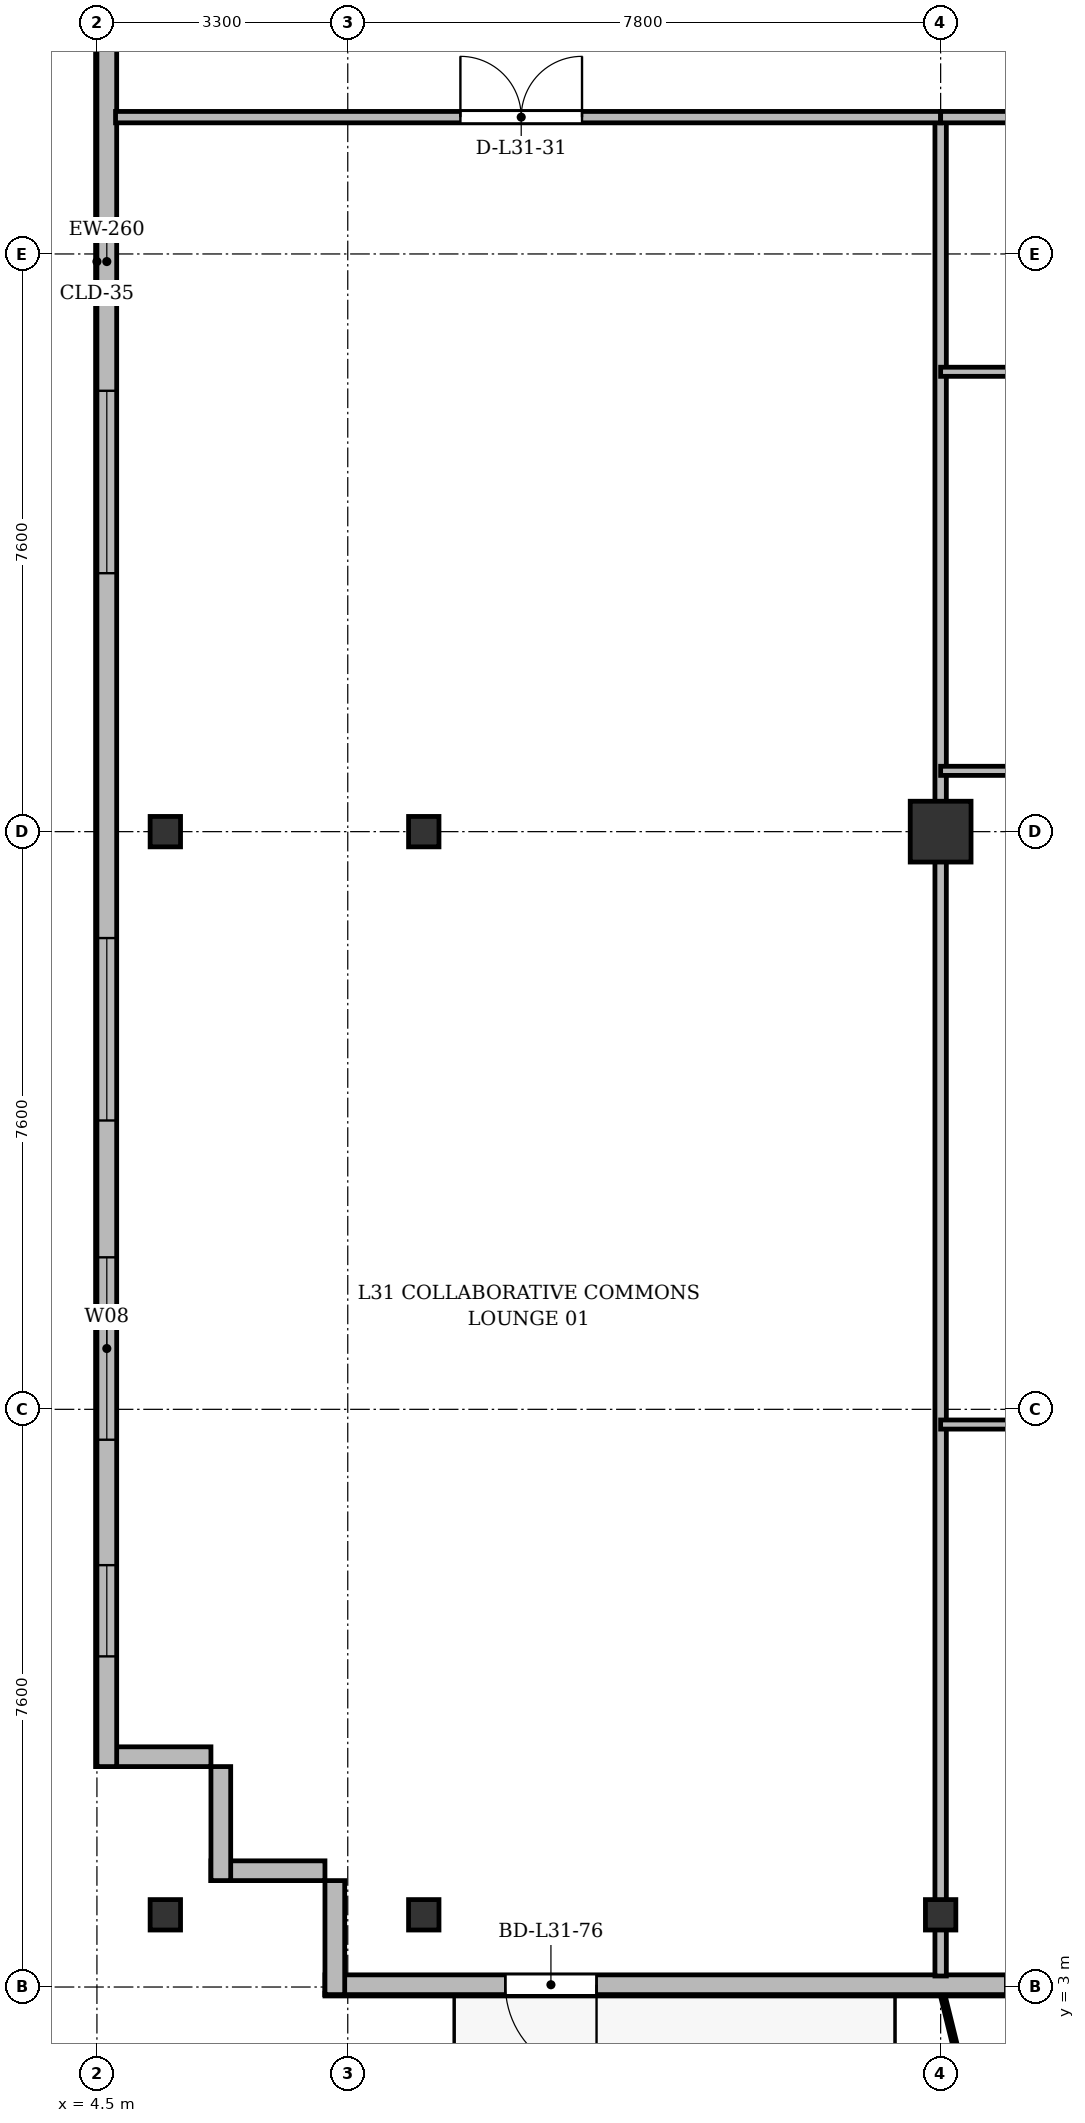
"""IFC4 building model, lengths in metres.
Left out: names, types, materials, properties, quantities, classifications, styles, units other than length and angle.
Written with IfcOpenShell. Run it as: python <this file> out.ifc"""

import sys

from ifc_helpers import new_model, si_unit, direction, frame, frame_2d, origin, origin_2d, place, context, subcontext, project, spatial, rectangle, i_section, extrude, source, transform, mapped, element, fill, save


model = new_model("IFC4")
c1 = context("Model", 3, precision=1e-05, world=origin(), true_north=direction((0.0, 1.0)))
c2 = subcontext(c1, "Body", "Model", "MODEL_VIEW")
j1 = project(units=[si_unit("LENGTHUNIT", "METRE"), si_unit("PLANEANGLEUNIT", "RADIAN")], contexts=[c1])
p1 = place(None, origin())
s1 = spatial("IfcSite", under=j1, at=p1, CompositionType="ELEMENT")
p2 = place(p1, origin())
s2 = spatial("IfcBuilding", under=s1, at=p2, CompositionType="ELEMENT")
p3 = place(p2, frame((0.0, 0.0, 121.3)))
s3 = spatial("IfcBuildingStorey", under=s2, at=p3, CompositionType="ELEMENT", Elevation=121.3)
m1 = source(origin(), c2, "Body", "SweptSolid", [
    extrude(i_section(OverallWidth=0.4, OverallDepth=0.4, WebThickness=0.022, FlangeThickness=0.035, at=origin_2d()), origin(), (0.0, 0.0, 1.0), 3.6),
])
for number, where, z_axis, x_axis in (
    (1, (5.4, 3.95, 0.0), (0.0, 0.0, 1.0), (1.0, 0.0, 0.0)),
    (2, (5.4, 18.2, 0.0), (0.0, 0.0, 1.0), (1.0, 0.0, 0.0)),
    (3, (8.8, 3.95, 0.0), (0.0, 0.0, 1.0), (1.0, 0.0, 0.0)),
    (4, (8.8, 18.2, 0.0), (0.0, 0.0, 1.0), (1.0, 0.0, 0.0)),
    (5, (15.6, 3.95, 0.0), (0.0, 0.0, 1.0), (1.0, 0.0, 0.0)),
):
    element("IfcColumn", number, at=place(p3, frame(where, z_axis=z_axis, x_axis=x_axis)), inside=s3, PredefinedType="COLUMN", context=c2, shape_type="MappedRepresentation", body=[
        mapped(m1, transform((0.0, 0.0, 0.0), x_axis=(1.0, 0.0, 0.0), y_axis=(0.0, 1.0, 0.0), z_axis=(0.0, 0.0, 1.0), scale=1.0)),
    ])
m2 = source(origin(), c2, "Body", "SweptSolid", [
    extrude(rectangle(XDim=0.8, YDim=0.8, at=origin_2d()), origin(), (0.0, 0.0, 1.0), 3.6),
])
p4 = place(p3, frame((15.6, 18.2, 0.0), z_axis=(0.0, 0.0, 1.0), x_axis=(1.0, 0.0, 0.0)))
e6 = element("IfcColumn", 6, at=p4, inside=s3, PredefinedType="COLUMN", context=c2, shape_type="MappedRepresentation", body=[
    mapped(m2, transform((0.0, 0.0, 0.0), x_axis=(1.0, 0.0, 0.0), y_axis=(0.0, 1.0, 0.0), z_axis=(0.0, 0.0, 1.0), scale=1.0)),
])
for number, where, z_axis, x_axis in (
    (7, (7.5, 4.53, 0.0), (0.0, 0.0, 1.0), (-1.0, 0.0, 0.0)),
    (8, (6.13, 4.4, 0.0), (0.0, 0.0, 1.0), (0.0, 1.0, 0.0)),
):
    element("IfcWall", number, at=place(p3, frame(where, z_axis=z_axis, x_axis=x_axis)), inside=s3, PredefinedType="SOLIDWALL", context=c2, shape_type="SweptSolid", body=[
        extrude(rectangle(XDim=1.5, YDim=0.26, at=frame_2d((0.75, 0.0))), origin(), (0.0, 0.0, 1.0), 3.34),
    ])
p5 = place(p3, frame((6.0, 6.03, 0.0), z_axis=(0.0, 0.0, 1.0), x_axis=(-1.0, 0.0, 0.0)))
e9 = element("IfcWall", 9, at=p5, inside=s3, PredefinedType="SOLIDWALL", context=c2, shape_type="SweptSolid", body=[
    extrude(rectangle(XDim=1.5, YDim=0.26, at=frame_2d((0.75, 0.0))), origin(), (0.0, 0.0, 1.0), 2.84),
])
p6 = place(p3, frame((4.63, 5.9, 0.0), z_axis=(0.0, 0.0, 1.0), x_axis=(0.0, 1.0, 0.0)))
e10 = element("IfcWall", 10, at=p6, inside=s3, PredefinedType="SOLIDWALL", context=c2, shape_type="SweptSolid", body=[
    extrude(rectangle(XDim=39.6, YDim=0.26, at=frame_2d((19.8, 0.0))), origin(), (0.0, 0.0, 1.0), 3.34),
])
p7 = place(p6, frame((1.45, 0.0, 0.92)))
e11 = element("IfcOpeningElement", 11, at=p7, cuts=e10, PredefinedType="OPENING", context=c2, shape_type="SweptSolid", body=[
    extrude(rectangle(XDim=1.2, YDim=1.65, at=frame_2d((0.6, 0.825))), frame((0.0, 0.14, 0.0), z_axis=(0.0, -1.0, 0.0), x_axis=(1.0, 0.0, 0.0)), (0.0, 0.0, 1.0), 0.28),
])
p8 = place(p6, frame((4.3, 0.0, 0.92)))
e12 = element("IfcOpeningElement", 12, at=p8, cuts=e10, PredefinedType="OPENING", context=c2, shape_type="SweptSolid", body=[
    extrude(rectangle(XDim=2.4, YDim=2.1, at=frame_2d((1.2, 1.05))), frame((0.0, 0.14, 0.0), z_axis=(0.0, -1.0, 0.0), x_axis=(1.0, 0.0, 0.0)), (0.0, 0.0, 1.0), 0.28),
])
p9 = place(p6, frame((8.5, 0.0, 0.92)))
e13 = element("IfcOpeningElement", 13, at=p9, cuts=e10, PredefinedType="OPENING", context=c2, shape_type="SweptSolid", body=[
    extrude(rectangle(XDim=2.4, YDim=2.1, at=frame_2d((1.2, 1.05))), frame((0.0, 0.14, 0.0), z_axis=(0.0, -1.0, 0.0), x_axis=(1.0, 0.0, 0.0)), (0.0, 0.0, 1.0), 0.28),
])
p10 = place(p6, frame((15.7, 0.0, 0.92)))
e14 = element("IfcOpeningElement", 14, at=p10, cuts=e10, PredefinedType="OPENING", context=c2, shape_type="SweptSolid", body=[
    extrude(rectangle(XDim=2.4, YDim=2.1, at=frame_2d((1.2, 1.05))), frame((0.0, 0.14, 0.0), z_axis=(0.0, -1.0, 0.0), x_axis=(1.0, 0.0, 0.0)), (0.0, 0.0, 1.0), 0.28),
])
p11 = place(p6, frame((29.7, 0.0, 0.92)))
e15 = element("IfcOpeningElement", 15, at=p11, cuts=e10, PredefinedType="OPENING", context=c2, shape_type="SweptSolid", body=[
    extrude(rectangle(XDim=2.4, YDim=2.1, at=frame_2d((1.2, 1.05))), frame((0.0, 0.14, 0.0), z_axis=(0.0, -1.0, 0.0), x_axis=(1.0, 0.0, 0.0)), (0.0, 0.0, 1.0), 0.28),
])
p12 = place(p6, frame((37.25, 0.0, 0.92)))
e16 = element("IfcOpeningElement", 16, at=p12, cuts=e10, PredefinedType="OPENING", context=c2, shape_type="SweptSolid", body=[
    extrude(rectangle(XDim=1.2, YDim=1.65, at=frame_2d((0.6, 0.825))), frame((0.0, 0.14, 0.0), z_axis=(0.0, -1.0, 0.0), x_axis=(1.0, 0.0, 0.0)), (0.0, 0.0, 1.0), 0.28),
])
p13 = place(p3, frame((44.8, 3.03, 0.0), z_axis=(0.0, 0.0, 1.0), x_axis=(-1.0, 0.0, 0.0)))
e17 = element("IfcWall", 17, at=p13, inside=s3, PredefinedType="SOLIDWALL", context=c2, shape_type="SweptSolid", body=[
    extrude(rectangle(XDim=37.3, YDim=0.26, at=frame_2d((18.65, 0.0))), origin(), (0.0, 0.0, 1.0), 3.34),
])
p14 = place(p13, frame((3.15, 0.0, 0.9)))
e18 = element("IfcOpeningElement", 18, at=p14, cuts=e17, PredefinedType="OPENING", context=c2, shape_type="SweptSolid", body=[
    extrude(rectangle(XDim=1.5, YDim=1.75, at=frame_2d((0.75, 0.875))), frame((0.0, 0.14, 0.0), z_axis=(0.0, -1.0, 0.0), x_axis=(1.0, 0.0, 0.0)), (0.0, 0.0, 1.0), 0.28),
])
p15 = place(p13, frame((9.5, 0.0, 0.9)))
e19 = element("IfcOpeningElement", 19, at=p15, cuts=e17, PredefinedType="OPENING", context=c2, shape_type="SweptSolid", body=[
    extrude(rectangle(XDim=2.0, YDim=1.95, at=frame_2d((1.0, 0.975))), frame((0.0, 0.14, 0.0), z_axis=(0.0, -1.0, 0.0), x_axis=(1.0, 0.0, 0.0)), (0.0, 0.0, 1.0), 0.28),
])
p16 = place(p13, frame((17.109, 0.0, 0.0)))
e20 = element("IfcOpeningElement", 20, at=p16, cuts=e17, PredefinedType="OPENING", context=c2, shape_type="SweptSolid", body=[
    extrude(rectangle(XDim=1.2, YDim=2.2, at=frame_2d((0.6, 1.1))), frame((0.0, 0.14, 0.0), z_axis=(0.0, -1.0, 0.0), x_axis=(1.0, 0.0, 0.0)), (0.0, 0.0, 1.0), 0.28),
])
p17 = place(p13, frame((22.45, 0.0, 0.9)))
e21 = element("IfcOpeningElement", 21, at=p17, cuts=e17, PredefinedType="OPENING", context=c2, shape_type="SweptSolid", body=[
    extrude(rectangle(XDim=1.8, YDim=1.8, at=frame_2d((0.9, 0.9))), frame((0.0, 0.14, 0.0), z_axis=(0.0, -1.0, 0.0), x_axis=(1.0, 0.0, 0.0)), (0.0, 0.0, 1.0), 0.28),
])
p18 = place(p13, frame((26.15, 0.0, 0.9)))
e22 = element("IfcOpeningElement", 22, at=p18, cuts=e17, PredefinedType="OPENING", context=c2, shape_type="SweptSolid", body=[
    extrude(rectangle(XDim=2.2, YDim=1.8, at=frame_2d((1.1, 0.9))), frame((0.0, 0.14, 0.0), z_axis=(0.0, -1.0, 0.0), x_axis=(1.0, 0.0, 0.0)), (0.0, 0.0, 1.0), 0.28),
])
p19 = place(p13, frame((33.727, 0.0, 0.0)))
e23 = element("IfcOpeningElement", 23, at=p19, cuts=e17, PredefinedType="OPENING", context=c2, shape_type="SweptSolid", body=[
    extrude(rectangle(XDim=1.2, YDim=2.2, at=frame_2d((0.6, 1.1))), frame((0.0, 0.14, 0.0), z_axis=(0.0, -1.0, 0.0), x_axis=(1.0, 0.0, 0.0)), (0.0, 0.0, 1.0), 0.28),
])
p20 = place(p3, frame((7.63, 2.9, 0.0), z_axis=(0.0, 0.0, 1.0), x_axis=(0.0, 1.0, 0.0)))
e24 = element("IfcWall", 24, at=p20, inside=s3, PredefinedType="SOLIDWALL", context=c2, shape_type="SweptSolid", body=[
    extrude(rectangle(XDim=1.5, YDim=0.26, at=frame_2d((0.75, 0.0))), origin(), (0.0, 0.0, 1.0), 2.752),
])
p21 = place(p3, frame((15.6, 3.145, 0.0), z_axis=(0.0, 0.0, 1.0), x_axis=(0.0, 1.0, 0.0)))
e25 = element("IfcWall", 25, at=p21, inside=s3, PredefinedType="PARTITIONING", context=c2, shape_type="SweptSolid", body=[
    extrude(rectangle(XDim=24.455, YDim=0.15, at=frame_2d((12.228, 0.0))), origin(), (0.0, 0.0, 1.0), 2.84),
])
p22 = place(p3, frame((4.745, 27.6, 0.0), z_axis=(0.0, 0.0, 1.0), x_axis=(1.0, 0.0, 0.0)))
e26 = element("IfcWall", 26, at=p22, inside=s3, PredefinedType="PARTITIONING", context=c2, shape_type="SweptSolid", body=[
    extrude(rectangle(XDim=10.855, YDim=0.15, at=frame_2d((5.427, 0.0))), origin(), (0.0, 0.0, 1.0), 2.84),
])
p23 = place(p22, frame((4.537, 0.0, 0.0)))
e27 = element("IfcOpeningElement", 27, at=p23, cuts=e26, PredefinedType="OPENING", context=c2, shape_type="SweptSolid", body=[
    extrude(rectangle(XDim=1.6, YDim=2.2, at=frame_2d((0.8, 1.1))), frame((0.0, 0.085, 0.0), z_axis=(0.0, -1.0, 0.0), x_axis=(1.0, 0.0, 0.0)), (0.0, 0.0, 1.0), 0.17),
])
p24 = place(p3, frame((15.6, 19.0, 0.0), z_axis=(0.0, 0.0, 1.0), x_axis=(1.0, 0.0, 0.0)))
e28 = element("IfcWall", 28, at=p24, inside=s3, PredefinedType="PARTITIONING", context=c2, shape_type="SweptSolid", body=[
    extrude(rectangle(XDim=7.8, YDim=0.12, at=frame_2d((3.9, 0.0))), origin(), (0.0, 0.0, 1.0), 2.84),
])
p25 = place(p24, frame((3.333, 0.0, 0.0)))
e29 = element("IfcOpeningElement", 29, at=p25, cuts=e28, PredefinedType="OPENING", context=c2, shape_type="SweptSolid", body=[
    extrude(rectangle(XDim=0.95, YDim=2.15, at=frame_2d((0.475, 1.075))), frame((0.0, 0.07, 0.0), z_axis=(0.0, -1.0, 0.0), x_axis=(1.0, 0.0, 0.0)), (0.0, 0.0, 1.0), 0.14),
])
p26 = place(p3, frame((15.6, 24.25, 0.0), z_axis=(0.0, 0.0, 1.0), x_axis=(1.0, 0.0, 0.0)))
e30 = element("IfcWall", 30, at=p26, inside=s3, PredefinedType="PARTITIONING", context=c2, shape_type="SweptSolid", body=[
    extrude(rectangle(XDim=2.4, YDim=0.12, at=frame_2d((1.2, 0.0))), origin(), (0.0, 0.0, 1.0), 2.84),
])
p27 = place(p3, frame((15.6, 27.6, 0.0), z_axis=(0.0, 0.0, 1.0), x_axis=(1.0, 0.0, 0.0)))
e31 = element("IfcWall", 31, at=p27, inside=s3, PredefinedType="PARTITIONING", context=c2, shape_type="SweptSolid", body=[
    extrude(rectangle(XDim=7.8, YDim=0.15, at=frame_2d((3.9, 0.0))), origin(), (0.0, 0.0, 1.0), 2.84),
])
p28 = place(p27, frame((5.172, 0.0, 0.0)))
e32 = element("IfcOpeningElement", 32, at=p28, cuts=e31, PredefinedType="OPENING", context=c2, shape_type="SweptSolid", body=[
    extrude(rectangle(XDim=0.95, YDim=2.15, at=frame_2d((0.475, 1.075))), frame((0.0, 0.085, 0.0), z_axis=(0.0, -1.0, 0.0), x_axis=(1.0, 0.0, 0.0)), (0.0, 0.0, 1.0), 0.17),
])
p29 = place(p3, frame((15.6, 10.4, 0.0), z_axis=(0.0, 0.0, 1.0), x_axis=(1.0, 0.0, 0.0)))
e33 = element("IfcWall", 33, at=p29, inside=s3, PredefinedType="PARTITIONING", context=c2, shape_type="SweptSolid", body=[
    extrude(rectangle(XDim=3.9, YDim=0.12, at=frame_2d((1.95, 0.0))), origin(), (0.0, 0.0, 1.0), 2.84),
])
p30 = place(p29, frame((1.475, 0.0, 0.0)))
e34 = element("IfcOpeningElement", 34, at=p30, cuts=e33, PredefinedType="OPENING", context=c2, shape_type="SweptSolid", body=[
    extrude(rectangle(XDim=0.95, YDim=2.15, at=frame_2d((0.475, 1.075))), frame((0.0, 0.07, 0.0), z_axis=(0.0, -1.0, 0.0), x_axis=(1.0, 0.0, 0.0)), (0.0, 0.0, 1.0), 0.14),
])
m3 = source(origin(), c2, "Body", "SweptSolid", [
    extrude(rectangle(XDim=1.2, YDim=1.65, at=frame_2d((0.6, 0.825))), frame((0.0, 0.03, 0.0), z_axis=(0.0, -1.0, 0.0), x_axis=(1.0, 0.0, 0.0)), (0.0, 0.0, 1.0), 0.06),
])
p31 = place(p7, origin())
e35 = element("IfcWindow", 35, at=p31, inside=s3, PartitioningType="SINGLE_PANEL", PredefinedType="WINDOW", context=c2, shape_type="MappedRepresentation", body=[
    mapped(m3, transform((0.0, 0.0, 0.0), x_axis=(1.0, 0.0, 0.0), y_axis=(0.0, 1.0, 0.0), z_axis=(0.0, 0.0, 1.0), scale=1.0)),
])
fill(e11, e35)
m4 = source(origin(), c2, "Body", "SweptSolid", [
    extrude(rectangle(XDim=2.4, YDim=2.1, at=frame_2d((1.2, 1.05))), frame((0.0, 0.03, 0.0), z_axis=(0.0, -1.0, 0.0), x_axis=(1.0, 0.0, 0.0)), (0.0, 0.0, 1.0), 0.06),
])
p32 = place(p8, origin())
e36 = element("IfcWindow", 36, at=p32, inside=s3, PartitioningType="SINGLE_PANEL", PredefinedType="WINDOW", context=c2, shape_type="MappedRepresentation", body=[
    mapped(m4, transform((0.0, 0.0, 0.0), x_axis=(1.0, 0.0, 0.0), y_axis=(0.0, 1.0, 0.0), z_axis=(0.0, 0.0, 1.0), scale=1.0)),
])
fill(e12, e36)
p33 = place(p9, origin())
e37 = element("IfcWindow", 37, at=p33, inside=s3, PartitioningType="SINGLE_PANEL", PredefinedType="WINDOW", context=c2, shape_type="MappedRepresentation", body=[
    mapped(m4, transform((0.0, 0.0, 0.0), x_axis=(1.0, 0.0, 0.0), y_axis=(0.0, 1.0, 0.0), z_axis=(0.0, 0.0, 1.0), scale=1.0)),
])
fill(e13, e37)
p34 = place(p10, origin())
e38 = element("IfcWindow", 38, at=p34, inside=s3, PartitioningType="SINGLE_PANEL", PredefinedType="WINDOW", context=c2, shape_type="MappedRepresentation", body=[
    mapped(m4, transform((0.0, 0.0, 0.0), x_axis=(1.0, 0.0, 0.0), y_axis=(0.0, 1.0, 0.0), z_axis=(0.0, 0.0, 1.0), scale=1.0)),
])
fill(e14, e38)
m5 = source(origin(), c2, "Body", "SweptSolid", [
    extrude(rectangle(XDim=1.2, YDim=2.2, at=frame_2d((0.6, 1.1))), frame((0.0, 0.025, 0.0), z_axis=(0.0, -1.0, 0.0), x_axis=(1.0, 0.0, 0.0)), (0.0, 0.0, 1.0), 0.05),
])
p35 = place(p19, origin())
e39 = element("IfcDoor", 39, at=p35, inside=s3, OperationType="SINGLE_SWING_LEFT", PredefinedType="DOOR", context=c2, shape_type="MappedRepresentation", body=[
    mapped(m5, transform((0.0, 0.0, 0.0), x_axis=(1.0, 0.0, 0.0), y_axis=(0.0, 1.0, 0.0), z_axis=(0.0, 0.0, 1.0), scale=1.0)),
])
fill(e23, e39)
m6 = source(origin(), c2, "Body", "SweptSolid", [
    extrude(rectangle(XDim=1.6, YDim=2.2, at=frame_2d((0.8, 1.1))), frame((0.0, 0.025, 0.0), z_axis=(0.0, -1.0, 0.0), x_axis=(1.0, 0.0, 0.0)), (0.0, 0.0, 1.0), 0.05),
])
p36 = place(p23, origin())
e40 = element("IfcDoor", 40, at=p36, inside=s3, OperationType="DOUBLE_DOOR_SINGLE_SWING", PredefinedType="DOOR", context=c2, shape_type="MappedRepresentation", body=[
    mapped(m6, transform((0.0, 0.0, 0.0), x_axis=(1.0, 0.0, 0.0), y_axis=(0.0, 1.0, 0.0), z_axis=(0.0, 0.0, 1.0), scale=1.0)),
])
fill(e27, e40)
save(model, sys.argv[1])
